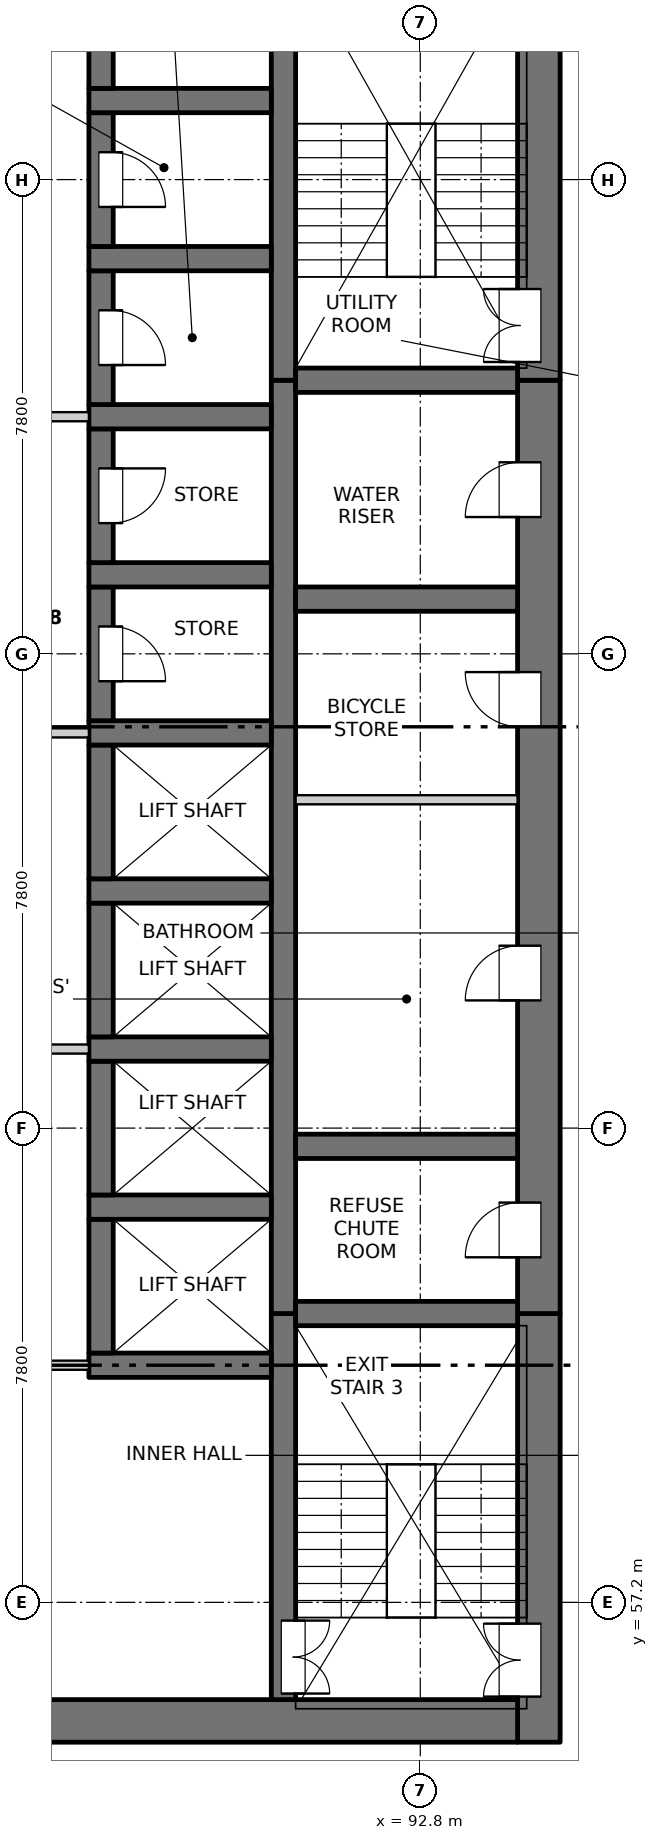
"""IFC4 building model, lengths in metres.
Left out: names, types, materials, properties, quantities, classifications, styles, units other than length and angle.
Written with IfcOpenShell. Run it as: python <this file> out.ifc"""

import sys

from ifc_helpers import new_model, si_unit, direction, frame, frame_2d, origin, place, context, subcontext, project, spatial, rectangle, extrude, element, fill, save


model = new_model("IFC4")
c1 = context("Model", 3, precision=1e-05, world=origin(), true_north=direction((0.0, 1.0)))
c2 = subcontext(c1, "Body", "Model", "MODEL_VIEW")
j1 = project(units=[si_unit("LENGTHUNIT", "METRE"), si_unit("PLANEANGLEUNIT", "RADIAN")], contexts=[c1])
p1 = place(None, origin())
s1 = spatial("IfcSite", under=j1, at=p1, CompositionType="ELEMENT")
p2 = place(p1, origin())
s2 = spatial("IfcBuilding", under=s1, at=p2, CompositionType="ELEMENT")
p3 = place(p2, frame((0.0, 0.0, 58.0)))
s3 = spatial("IfcBuildingStorey", under=s2, at=p3, CompositionType="ELEMENT", Elevation=58.0)
p4 = place(p3, frame((94.75, 54.9, -0.25), z_axis=(0.0, 0.0, 1.0), x_axis=(0.0, 1.0, 0.0)))
e1 = element("IfcWall", 1, at=p4, inside=s3, PredefinedType="SOLIDWALL", context=c2, shape_type="SweptSolid", body=[
    extrude(rectangle(XDim=7.05, YDim=0.7, at=frame_2d((3.525, 0.0))), origin(), (0.0, 0.0, 1.0), 3.4),
])
p5 = place(p4, frame((0.75, 0.0, 0.25)))
e2 = element("IfcOpeningElement", 2, at=p5, cuts=e1, PredefinedType="OPENING", context=c2, shape_type="SweptSolid", body=[
    extrude(rectangle(XDim=1.2, YDim=2.1, at=frame_2d((0.6, 1.05))), frame((0.0, 0.36, 0.0), z_axis=(0.0, -1.0, 0.0), x_axis=(1.0, 0.0, 0.0)), (0.0, 0.0, 1.0), 0.72),
])
p6 = place(p3, frame((94.75, 61.95, -0.25), z_axis=(0.0, 0.0, 1.0), x_axis=(0.0, 1.0, 0.0)))
e3 = element("IfcWall", 3, at=p6, inside=s3, PredefinedType="SOLIDWALL", context=c2, shape_type="SweptSolid", body=[
    extrude(rectangle(XDim=15.35, YDim=0.7, at=frame_2d((7.675, 0.0))), origin(), (0.0, 0.0, 1.0), 3.4),
])
p7 = place(p6, frame((0.925, 0.0, 0.25)))
e4 = element("IfcOpeningElement", 4, at=p7, cuts=e3, PredefinedType="OPENING", context=c2, shape_type="SweptSolid", body=[
    extrude(rectangle(XDim=0.9, YDim=2.1, at=frame_2d((0.45, 1.05))), frame((0.0, 0.36, 0.0), z_axis=(0.0, -1.0, 0.0), x_axis=(1.0, 0.0, 0.0)), (0.0, 0.0, 1.0), 0.72),
])
p8 = place(p6, frame((5.15, 0.0, 0.25)))
e5 = element("IfcOpeningElement", 5, at=p8, cuts=e3, PredefinedType="OPENING", context=c2, shape_type="SweptSolid", body=[
    extrude(rectangle(XDim=0.9, YDim=2.1, at=frame_2d((0.45, 1.05))), frame((0.0, 0.36, 0.0), z_axis=(0.0, -1.0, 0.0), x_axis=(1.0, 0.0, 0.0)), (0.0, 0.0, 1.0), 0.72),
])
p9 = place(p6, frame((9.65, 0.0, 0.25)))
e6 = element("IfcOpeningElement", 6, at=p9, cuts=e3, PredefinedType="OPENING", context=c2, shape_type="SweptSolid", body=[
    extrude(rectangle(XDim=0.9, YDim=2.1, at=frame_2d((0.45, 1.05))), frame((0.0, 0.36, 0.0), z_axis=(0.0, -1.0, 0.0), x_axis=(1.0, 0.0, 0.0)), (0.0, 0.0, 1.0), 0.72),
])
p10 = place(p6, frame((13.1, 0.0, 0.25)))
e7 = element("IfcOpeningElement", 7, at=p10, cuts=e3, PredefinedType="OPENING", context=c2, shape_type="SweptSolid", body=[
    extrude(rectangle(XDim=0.9, YDim=2.1, at=frame_2d((0.45, 1.05))), frame((0.0, 0.36, 0.0), z_axis=(0.0, -1.0, 0.0), x_axis=(1.0, 0.0, 0.0)), (0.0, 0.0, 1.0), 0.72),
])
p11 = place(p3, frame((94.75, 77.3, -0.25), z_axis=(0.0, 0.0, 1.0), x_axis=(0.0, 1.0, 0.0)))
e8 = element("IfcWall", 8, at=p11, inside=s3, PredefinedType="SOLIDWALL", context=c2, shape_type="SweptSolid", body=[
    extrude(rectangle(XDim=7.55, YDim=0.7, at=frame_2d((3.775, 0.0))), origin(), (0.0, 0.0, 1.0), 3.4),
])
p12 = place(p11, frame((0.3, 0.0, 0.25)))
e9 = element("IfcOpeningElement", 9, at=p12, cuts=e8, PredefinedType="OPENING", context=c2, shape_type="SweptSolid", body=[
    extrude(rectangle(XDim=1.2, YDim=2.1, at=frame_2d((0.6, 1.05))), frame((0.0, 0.36, 0.0), z_axis=(0.0, -1.0, 0.0), x_axis=(1.0, 0.0, 0.0)), (0.0, 0.0, 1.0), 0.72),
])
p13 = place(p3, frame((75.6, 55.25, -0.25), z_axis=(0.0, 0.0, 1.0), x_axis=(1.0, 0.0, 0.0)))
e10 = element("IfcWall", 10, at=p13, inside=s3, PredefinedType="SOLIDWALL", context=c2, shape_type="SweptSolid", body=[
    extrude(rectangle(XDim=18.8, YDim=0.7, at=frame_2d((9.4, 0.0))), origin(), (0.0, 0.0, 1.0), 3.4),
])
p14 = place(p13, frame((8.65, 0.0, 0.25)))
e11 = element("IfcOpeningElement", 11, at=p14, cuts=e10, PredefinedType="OPENING", context=c2, shape_type="SweptSolid", body=[
    extrude(rectangle(XDim=1.5, YDim=2.1, at=frame_2d((0.75, 1.05))), frame((0.0, 0.36, 0.0), z_axis=(0.0, -1.0, 0.0), x_axis=(1.0, 0.0, 0.0)), (0.0, 0.0, 1.0), 0.72),
])
p15 = place(p3, frame((90.55, 55.6, -0.25), z_axis=(0.0, 0.0, 1.0), x_axis=(0.0, 1.0, 0.0)))
e12 = element("IfcWall", 12, at=p15, inside=s3, PredefinedType="SOLIDWALL", context=c2, shape_type="SweptSolid", body=[
    extrude(rectangle(XDim=6.35, YDim=0.4, at=frame_2d((3.175, 0.0))), origin(), (0.0, 0.0, 1.0), 3.4),
])
p16 = place(p15, frame((0.1, 0.0, 0.25)))
e13 = element("IfcOpeningElement", 13, at=p16, cuts=e12, PredefinedType="OPENING", context=c2, shape_type="SweptSolid", body=[
    extrude(rectangle(XDim=1.2, YDim=2.1, at=frame_2d((0.6, 1.05))), frame((0.0, 0.21, 0.0), z_axis=(0.0, -1.0, 0.0), x_axis=(1.0, 0.0, 0.0)), (0.0, 0.0, 1.0), 0.42),
])
p17 = place(p3, frame((90.55, 61.95, -0.25), z_axis=(0.0, 0.0, 1.0), x_axis=(0.0, 1.0, 0.0)))
e14 = element("IfcWall", 14, at=p17, inside=s3, PredefinedType="SOLIDWALL", context=c2, shape_type="SweptSolid", body=[
    extrude(rectangle(XDim=15.35, YDim=0.4, at=frame_2d((7.675, 0.0))), origin(), (0.0, 0.0, 1.0), 3.4),
])
p18 = place(p3, frame((90.55, 77.3, -0.25), z_axis=(0.0, 0.0, 1.0), x_axis=(0.0, 1.0, 0.0)))
e15 = element("IfcWall", 15, at=p18, inside=s3, PredefinedType="SOLIDWALL", context=c2, shape_type="SweptSolid", body=[
    extrude(rectangle(XDim=6.85, YDim=0.4, at=frame_2d((3.425, 0.0))), origin(), (0.0, 0.0, 1.0), 3.4),
])
p19 = place(p3, frame((87.35, 61.1, -0.25), z_axis=(0.0, 0.0, 1.0), x_axis=(1.0, 0.0, 0.0)))
e16 = element("IfcWall", 16, at=p19, inside=s3, PredefinedType="SOLIDWALL", context=c2, shape_type="SweptSolid", body=[
    extrude(rectangle(XDim=3.0, YDim=0.4, at=frame_2d((1.5, 0.0))), origin(), (0.0, 0.0, 1.0), 3.4),
])
p20 = place(p3, frame((87.55, 61.3, -0.25), z_axis=(0.0, 0.0, 1.0), x_axis=(0.0, 1.0, 0.0)))
e17 = element("IfcWall", 17, at=p20, inside=s3, PredefinedType="SOLIDWALL", context=c2, shape_type="SweptSolid", body=[
    extrude(rectangle(XDim=2.2, YDim=0.4, at=frame_2d((1.1, 0.0))), origin(), (0.0, 0.0, 1.0), 3.4),
])
p21 = place(p3, frame((87.35, 63.7, -0.25), z_axis=(0.0, 0.0, 1.0), x_axis=(1.0, 0.0, 0.0)))
e18 = element("IfcWall", 18, at=p21, inside=s3, PredefinedType="SOLIDWALL", context=c2, shape_type="SweptSolid", body=[
    extrude(rectangle(XDim=3.0, YDim=0.4, at=frame_2d((1.5, 0.0))), origin(), (0.0, 0.0, 1.0), 3.4),
])
p22 = place(p3, frame((87.55, 63.9, -0.25), z_axis=(0.0, 0.0, 1.0), x_axis=(0.0, 1.0, 0.0)))
e19 = element("IfcWall", 19, at=p22, inside=s3, PredefinedType="SOLIDWALL", context=c2, shape_type="SweptSolid", body=[
    extrude(rectangle(XDim=2.2, YDim=0.4, at=frame_2d((1.1, 0.0))), origin(), (0.0, 0.0, 1.0), 3.4),
])
p23 = place(p3, frame((87.35, 66.3, -0.25), z_axis=(0.0, 0.0, 1.0), x_axis=(1.0, 0.0, 0.0)))
e20 = element("IfcWall", 20, at=p23, inside=s3, PredefinedType="SOLIDWALL", context=c2, shape_type="SweptSolid", body=[
    extrude(rectangle(XDim=3.0, YDim=0.4, at=frame_2d((1.5, 0.0))), origin(), (0.0, 0.0, 1.0), 3.4),
])
p24 = place(p3, frame((87.55, 66.5, -0.25), z_axis=(0.0, 0.0, 1.0), x_axis=(0.0, 1.0, 0.0)))
e21 = element("IfcWall", 21, at=p24, inside=s3, PredefinedType="SOLIDWALL", context=c2, shape_type="SweptSolid", body=[
    extrude(rectangle(XDim=2.2, YDim=0.4, at=frame_2d((1.1, 0.0))), origin(), (0.0, 0.0, 1.0), 3.4),
])
p25 = place(p3, frame((87.35, 68.9, -0.25), z_axis=(0.0, 0.0, 1.0), x_axis=(1.0, 0.0, 0.0)))
e22 = element("IfcWall", 22, at=p25, inside=s3, PredefinedType="SOLIDWALL", context=c2, shape_type="SweptSolid", body=[
    extrude(rectangle(XDim=3.0, YDim=0.4, at=frame_2d((1.5, 0.0))), origin(), (0.0, 0.0, 1.0), 3.4),
])
p26 = place(p3, frame((87.55, 69.1, -0.25), z_axis=(0.0, 0.0, 1.0), x_axis=(0.0, 1.0, 0.0)))
e23 = element("IfcWall", 23, at=p26, inside=s3, PredefinedType="SOLIDWALL", context=c2, shape_type="SweptSolid", body=[
    extrude(rectangle(XDim=2.2, YDim=0.4, at=frame_2d((1.1, 0.0))), origin(), (0.0, 0.0, 1.0), 3.4),
])
p27 = place(p3, frame((87.35, 71.5, -0.25), z_axis=(0.0, 0.0, 1.0), x_axis=(1.0, 0.0, 0.0)))
e24 = element("IfcWall", 24, at=p27, inside=s3, PredefinedType="SOLIDWALL", context=c2, shape_type="SweptSolid", body=[
    extrude(rectangle(XDim=3.0, YDim=0.4, at=frame_2d((1.5, 0.0))), origin(), (0.0, 0.0, 1.0), 3.4),
])
p28 = place(p3, frame((87.55, 71.7, -0.25), z_axis=(0.0, 0.0, 1.0), x_axis=(0.0, 1.0, 0.0)))
e25 = element("IfcWall", 25, at=p28, inside=s3, PredefinedType="SOLIDWALL", context=c2, shape_type="SweptSolid", body=[
    extrude(rectangle(XDim=2.2, YDim=0.4, at=frame_2d((1.1, 0.0))), origin(), (0.0, 0.0, 1.0), 3.4),
])
p29 = place(p28, frame((0.65, 0.0, 0.25)))
e26 = element("IfcOpeningElement", 26, at=p29, cuts=e25, PredefinedType="OPENING", context=c2, shape_type="SweptSolid", body=[
    extrude(rectangle(XDim=0.9, YDim=2.1, at=frame_2d((0.45, 1.05))), frame((0.0, 0.21, 0.0), z_axis=(0.0, -1.0, 0.0), x_axis=(1.0, 0.0, 0.0)), (0.0, 0.0, 1.0), 0.42),
])
p30 = place(p3, frame((87.35, 74.1, -0.25), z_axis=(0.0, 0.0, 1.0), x_axis=(1.0, 0.0, 0.0)))
e27 = element("IfcWall", 27, at=p30, inside=s3, PredefinedType="SOLIDWALL", context=c2, shape_type="SweptSolid", body=[
    extrude(rectangle(XDim=3.0, YDim=0.4, at=frame_2d((1.5, 0.0))), origin(), (0.0, 0.0, 1.0), 3.4),
])
p31 = place(p3, frame((87.55, 74.3, -0.25), z_axis=(0.0, 0.0, 1.0), x_axis=(0.0, 1.0, 0.0)))
e28 = element("IfcWall", 28, at=p31, inside=s3, PredefinedType="SOLIDWALL", context=c2, shape_type="SweptSolid", body=[
    extrude(rectangle(XDim=2.2, YDim=0.4, at=frame_2d((1.1, 0.0))), origin(), (0.0, 0.0, 1.0), 3.4),
])
p32 = place(p31, frame((0.65, 0.0, 0.25)))
e29 = element("IfcOpeningElement", 29, at=p32, cuts=e28, PredefinedType="OPENING", context=c2, shape_type="SweptSolid", body=[
    extrude(rectangle(XDim=0.9, YDim=2.1, at=frame_2d((0.45, 1.05))), frame((0.0, 0.21, 0.0), z_axis=(0.0, -1.0, 0.0), x_axis=(1.0, 0.0, 0.0)), (0.0, 0.0, 1.0), 0.42),
])
p33 = place(p3, frame((87.35, 76.7, -0.25), z_axis=(0.0, 0.0, 1.0), x_axis=(1.0, 0.0, 0.0)))
e30 = element("IfcWall", 30, at=p33, inside=s3, PredefinedType="SOLIDWALL", context=c2, shape_type="SweptSolid", body=[
    extrude(rectangle(XDim=3.0, YDim=0.4, at=frame_2d((1.5, 0.0))), origin(), (0.0, 0.0, 1.0), 3.4),
])
p34 = place(p3, frame((87.55, 76.9, -0.25), z_axis=(0.0, 0.0, 1.0), x_axis=(0.0, 1.0, 0.0)))
e31 = element("IfcWall", 31, at=p34, inside=s3, PredefinedType="SOLIDWALL", context=c2, shape_type="SweptSolid", body=[
    extrude(rectangle(XDim=2.2, YDim=0.4, at=frame_2d((1.1, 0.0))), origin(), (0.0, 0.0, 1.0), 3.4),
])
p35 = place(p34, frame((0.65, 0.0, 0.25)))
e32 = element("IfcOpeningElement", 32, at=p35, cuts=e31, PredefinedType="OPENING", context=c2, shape_type="SweptSolid", body=[
    extrude(rectangle(XDim=0.9, YDim=2.1, at=frame_2d((0.45, 1.05))), frame((0.0, 0.21, 0.0), z_axis=(0.0, -1.0, 0.0), x_axis=(1.0, 0.0, 0.0)), (0.0, 0.0, 1.0), 0.42),
])
p36 = place(p3, frame((87.35, 79.3, -0.25), z_axis=(0.0, 0.0, 1.0), x_axis=(1.0, 0.0, 0.0)))
e33 = element("IfcWall", 33, at=p36, inside=s3, PredefinedType="SOLIDWALL", context=c2, shape_type="SweptSolid", body=[
    extrude(rectangle(XDim=3.0, YDim=0.4, at=frame_2d((1.5, 0.0))), origin(), (0.0, 0.0, 1.0), 3.4),
])
p37 = place(p3, frame((87.55, 79.5, -0.25), z_axis=(0.0, 0.0, 1.0), x_axis=(0.0, 1.0, 0.0)))
e34 = element("IfcWall", 34, at=p37, inside=s3, PredefinedType="SOLIDWALL", context=c2, shape_type="SweptSolid", body=[
    extrude(rectangle(XDim=2.2, YDim=0.4, at=frame_2d((1.1, 0.0))), origin(), (0.0, 0.0, 1.0), 3.4),
])
p38 = place(p37, frame((0.65, 0.0, 0.25)))
e35 = element("IfcOpeningElement", 35, at=p38, cuts=e34, PredefinedType="OPENING", context=c2, shape_type="SweptSolid", body=[
    extrude(rectangle(XDim=0.9, YDim=2.1, at=frame_2d((0.45, 1.05))), frame((0.0, 0.21, 0.0), z_axis=(0.0, -1.0, 0.0), x_axis=(1.0, 0.0, 0.0)), (0.0, 0.0, 1.0), 0.42),
])
p39 = place(p3, frame((87.35, 81.9, -0.25), z_axis=(0.0, 0.0, 1.0), x_axis=(1.0, 0.0, 0.0)))
e36 = element("IfcWall", 36, at=p39, inside=s3, PredefinedType="SOLIDWALL", context=c2, shape_type="SweptSolid", body=[
    extrude(rectangle(XDim=3.0, YDim=0.4, at=frame_2d((1.5, 0.0))), origin(), (0.0, 0.0, 1.0), 3.4),
])
p40 = place(p3, frame((87.55, 82.1, -0.25), z_axis=(0.0, 0.0, 1.0), x_axis=(0.0, 1.0, 0.0)))
e37 = element("IfcWall", 37, at=p40, inside=s3, PredefinedType="SOLIDWALL", context=c2, shape_type="SweptSolid", body=[
    extrude(rectangle(XDim=2.05, YDim=0.4, at=frame_2d((1.025, 0.0))), origin(), (0.0, 0.0, 1.0), 3.4),
])
p41 = place(p40, frame((0.65, 0.0, 0.25)))
e38 = element("IfcOpeningElement", 38, at=p41, cuts=e37, PredefinedType="OPENING", context=c2, shape_type="SweptSolid", body=[
    extrude(rectangle(XDim=0.9, YDim=2.1, at=frame_2d((0.45, 1.05))), frame((0.0, 0.21, 0.0), z_axis=(0.0, -1.0, 0.0), x_axis=(1.0, 0.0, 0.0)), (0.0, 0.0, 1.0), 0.42),
])
for number, where, z_axis, x_axis in (
    (39, (90.75, 61.95, -0.25), (0.0, 0.0, 1.0), (1.0, 0.0, 0.0)),
    (40, (90.75, 64.7, -0.25), (0.0, 0.0, 1.0), (1.0, 0.0, 0.0)),
    (41, (90.75, 73.7, -0.25), (0.0, 0.0, 1.0), (1.0, 0.0, 0.0)),
    (42, (90.75, 77.3, -0.25), (0.0, 0.0, 1.0), (1.0, 0.0, 0.0)),
):
    element("IfcWall", number, at=place(p3, frame(where, z_axis=z_axis, x_axis=x_axis)), inside=s3, PredefinedType="SOLIDWALL", context=c2, shape_type="SweptSolid", body=[
        extrude(rectangle(XDim=3.65, YDim=0.4, at=frame_2d((1.825, 0.0))), origin(), (0.0, 0.0, 1.0), 3.4),
    ])
p42 = place(p3, frame((82.65, 61.1, 0.0), z_axis=(0.0, 0.0, 1.0), x_axis=(1.0, 0.0, 0.0)))
e43 = element("IfcWall", 43, at=p42, inside=s3, PredefinedType="PARTITIONING", context=c2, shape_type="SweptSolid", body=[
    extrude(rectangle(XDim=4.7, YDim=0.15, at=frame_2d((2.35, 0.0))), origin(), (0.0, 0.0, 1.0), 3.15),
])
p43 = place(p42, frame((1.45, 0.0, 0.0)))
e44 = element("IfcOpeningElement", 44, at=p43, cuts=e43, PredefinedType="OPENING", context=c2, shape_type="SweptSolid", body=[
    extrude(rectangle(XDim=1.8, YDim=2.1, at=frame_2d((0.9, 1.05))), frame((0.0, 0.085, 0.0), z_axis=(0.0, -1.0, 0.0), x_axis=(1.0, 0.0, 0.0)), (0.0, 0.0, 1.0), 0.17),
])
p44 = place(p3, frame((82.65, 66.3, 0.0), z_axis=(0.0, 0.0, 1.0), x_axis=(1.0, 0.0, 0.0)))
e45 = element("IfcWall", 45, at=p44, inside=s3, PredefinedType="PARTITIONING", context=c2, shape_type="SweptSolid", body=[
    extrude(rectangle(XDim=4.7, YDim=0.15, at=frame_2d((2.35, 0.0))), origin(), (0.0, 0.0, 1.0), 3.15),
])
p45 = place(p44, frame((1.45, 0.0, 0.0)))
e46 = element("IfcOpeningElement", 46, at=p45, cuts=e45, PredefinedType="OPENING", context=c2, shape_type="SweptSolid", body=[
    extrude(rectangle(XDim=1.8, YDim=2.1, at=frame_2d((0.9, 1.05))), frame((0.0, 0.085, 0.0), z_axis=(0.0, -1.0, 0.0), x_axis=(1.0, 0.0, 0.0)), (0.0, 0.0, 1.0), 0.17),
])
p46 = place(p3, frame((90.75, 70.4, 0.0), z_axis=(0.0, 0.0, 1.0), x_axis=(1.0, 0.0, 0.0)))
e47 = element("IfcWall", 47, at=p46, inside=s3, PredefinedType="PARTITIONING", context=c2, shape_type="SweptSolid", body=[
    extrude(rectangle(XDim=3.65, YDim=0.15, at=frame_2d((1.825, 0.0))), origin(), (0.0, 0.0, 1.0), 3.15),
])
p47 = place(p3, frame((82.65, 71.5, 0.0), z_axis=(0.0, 0.0, 1.0), x_axis=(1.0, 0.0, 0.0)))
e48 = element("IfcWall", 48, at=p47, inside=s3, PredefinedType="PARTITIONING", context=c2, shape_type="SweptSolid", body=[
    extrude(rectangle(XDim=4.7, YDim=0.15, at=frame_2d((2.35, 0.0))), origin(), (0.0, 0.0, 1.0), 3.15),
])
p48 = place(p47, frame((1.45, 0.0, 0.0)))
e49 = element("IfcOpeningElement", 49, at=p48, cuts=e48, PredefinedType="OPENING", context=c2, shape_type="SweptSolid", body=[
    extrude(rectangle(XDim=1.8, YDim=2.1, at=frame_2d((0.9, 1.05))), frame((0.0, 0.085, 0.0), z_axis=(0.0, -1.0, 0.0), x_axis=(1.0, 0.0, 0.0)), (0.0, 0.0, 1.0), 0.17),
])
p49 = place(p3, frame((82.65, 76.7, 0.0), z_axis=(0.0, 0.0, 1.0), x_axis=(1.0, 0.0, 0.0)))
e50 = element("IfcWall", 50, at=p49, inside=s3, PredefinedType="PARTITIONING", context=c2, shape_type="SweptSolid", body=[
    extrude(rectangle(XDim=4.7, YDim=0.15, at=frame_2d((2.35, 0.0))), origin(), (0.0, 0.0, 1.0), 3.15),
])
p50 = place(p49, frame((1.45, 0.0, 0.0)))
e51 = element("IfcOpeningElement", 51, at=p50, cuts=e50, PredefinedType="OPENING", context=c2, shape_type="SweptSolid", body=[
    extrude(rectangle(XDim=1.8, YDim=2.1, at=frame_2d((0.9, 1.05))), frame((0.0, 0.085, 0.0), z_axis=(0.0, -1.0, 0.0), x_axis=(1.0, 0.0, 0.0)), (0.0, 0.0, 1.0), 0.17),
])
p51 = place(p16, origin())
e52 = element("IfcDoor", 52, at=p51, inside=s3, OperationType="DOUBLE_DOOR_SINGLE_SWING", PredefinedType="DOOR", context=c2, shape_type="SweptSolid", body=[
    extrude(rectangle(XDim=1.2, YDim=2.1, at=frame_2d((0.6, 1.05))), frame((0.0, -0.135, 0.0), z_axis=(0.0, -1.0, 0.0), x_axis=(1.0, 0.0, 0.0)), (0.0, 0.0, 1.0), 0.05),
])
fill(e13, e52)
p52 = place(p5, origin())
e53 = element("IfcDoor", 53, at=p52, inside=s3, OperationType="DOUBLE_DOOR_SINGLE_SWING", PredefinedType="DOOR", context=c2, shape_type="SweptSolid", body=[
    extrude(rectangle(XDim=1.2, YDim=2.1, at=frame_2d((0.6, 1.05))), frame((0.0, 0.335, 0.0), z_axis=(0.0, -1.0, 0.0), x_axis=(1.0, 0.0, 0.0)), (0.0, 0.0, 1.0), 0.05),
])
fill(e2, e53)
p53 = place(p7, origin())
e54 = element("IfcDoor", 54, at=p53, inside=s3, OperationType="SINGLE_SWING_LEFT", PredefinedType="DOOR", context=c2, shape_type="SweptSolid", body=[
    extrude(rectangle(XDim=0.9, YDim=2.1, at=frame_2d((0.45, 1.05))), frame((0.0, 0.335, 0.0), z_axis=(0.0, -1.0, 0.0), x_axis=(1.0, 0.0, 0.0)), (0.0, 0.0, 1.0), 0.05),
])
fill(e4, e54)
p54 = place(p8, origin())
e55 = element("IfcDoor", 55, at=p54, inside=s3, OperationType="SINGLE_SWING_LEFT", PredefinedType="DOOR", context=c2, shape_type="SweptSolid", body=[
    extrude(rectangle(XDim=0.9, YDim=2.1, at=frame_2d((0.45, 1.05))), frame((0.0, 0.335, 0.0), z_axis=(0.0, -1.0, 0.0), x_axis=(1.0, 0.0, 0.0)), (0.0, 0.0, 1.0), 0.05),
])
fill(e5, e55)
p55 = place(p9, origin())
e56 = element("IfcDoor", 56, at=p55, inside=s3, OperationType="SINGLE_SWING_RIGHT", PredefinedType="DOOR", context=c2, shape_type="SweptSolid", body=[
    extrude(rectangle(XDim=0.9, YDim=2.1, at=frame_2d((0.45, 1.05))), frame((0.0, 0.335, 0.0), z_axis=(0.0, -1.0, 0.0), x_axis=(1.0, 0.0, 0.0)), (0.0, 0.0, 1.0), 0.05),
])
fill(e6, e56)
p56 = place(p29, origin())
e57 = element("IfcDoor", 57, at=p56, inside=s3, OperationType="SINGLE_SWING_RIGHT", PredefinedType="DOOR", context=c2, shape_type="SweptSolid", body=[
    extrude(rectangle(XDim=0.9, YDim=2.1, at=frame_2d((0.45, 1.05))), frame((0.0, -0.135, 0.0), z_axis=(0.0, -1.0, 0.0), x_axis=(1.0, 0.0, 0.0)), (0.0, 0.0, 1.0), 0.05),
])
fill(e26, e57)
p57 = place(p32, origin())
e58 = element("IfcDoor", 58, at=p57, inside=s3, OperationType="SINGLE_SWING_LEFT", PredefinedType="DOOR", context=c2, shape_type="SweptSolid", body=[
    extrude(rectangle(XDim=0.9, YDim=2.1, at=frame_2d((0.45, 1.05))), frame((0.0, -0.135, 0.0), z_axis=(0.0, -1.0, 0.0), x_axis=(1.0, 0.0, 0.0)), (0.0, 0.0, 1.0), 0.05),
])
fill(e29, e58)
p58 = place(p10, origin())
e59 = element("IfcDoor", 59, at=p58, inside=s3, OperationType="SINGLE_SWING_LEFT", PredefinedType="DOOR", context=c2, shape_type="SweptSolid", body=[
    extrude(rectangle(XDim=0.9, YDim=2.1, at=frame_2d((0.45, 1.05))), frame((0.0, 0.335, 0.0), z_axis=(0.0, -1.0, 0.0), x_axis=(1.0, 0.0, 0.0)), (0.0, 0.0, 1.0), 0.05),
])
fill(e7, e59)
p59 = place(p35, origin())
e60 = element("IfcDoor", 60, at=p59, inside=s3, OperationType="SINGLE_SWING_RIGHT", PredefinedType="DOOR", context=c2, shape_type="SweptSolid", body=[
    extrude(rectangle(XDim=0.9, YDim=2.1, at=frame_2d((0.45, 1.05))), frame((0.0, -0.135, 0.0), z_axis=(0.0, -1.0, 0.0), x_axis=(1.0, 0.0, 0.0)), (0.0, 0.0, 1.0), 0.05),
])
fill(e32, e60)
p60 = place(p12, origin())
e61 = element("IfcDoor", 61, at=p60, inside=s3, OperationType="DOUBLE_DOOR_SINGLE_SWING", PredefinedType="DOOR", context=c2, shape_type="SweptSolid", body=[
    extrude(rectangle(XDim=1.2, YDim=2.1, at=frame_2d((0.6, 1.05))), frame((0.0, 0.335, 0.0), z_axis=(0.0, -1.0, 0.0), x_axis=(1.0, 0.0, 0.0)), (0.0, 0.0, 1.0), 0.05),
])
fill(e9, e61)
p61 = place(p38, origin())
e62 = element("IfcDoor", 62, at=p61, inside=s3, OperationType="SINGLE_SWING_RIGHT", PredefinedType="DOOR", context=c2, shape_type="SweptSolid", body=[
    extrude(rectangle(XDim=0.9, YDim=2.1, at=frame_2d((0.45, 1.05))), frame((0.0, -0.135, 0.0), z_axis=(0.0, -1.0, 0.0), x_axis=(1.0, 0.0, 0.0)), (0.0, 0.0, 1.0), 0.05),
])
fill(e35, e62)
save(model, sys.argv[1])
